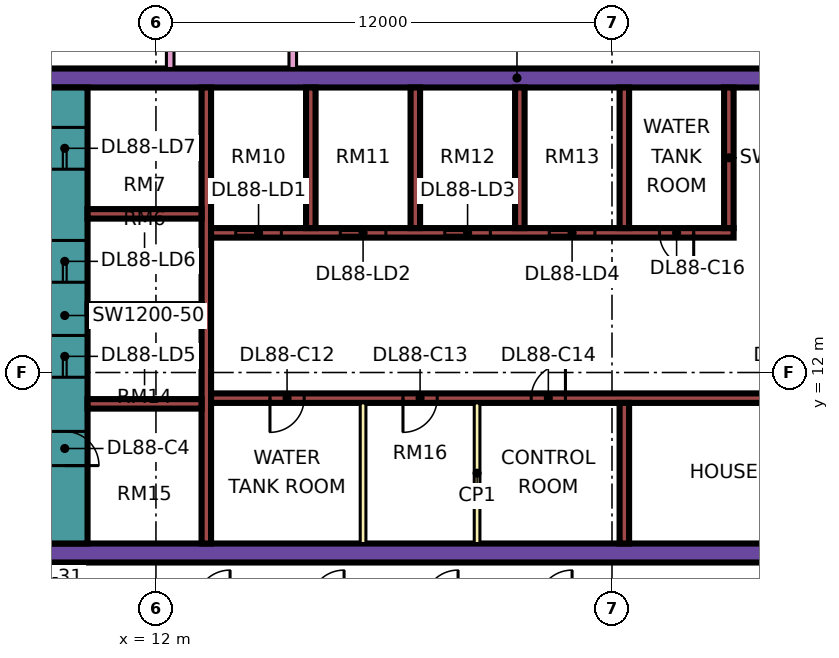
"""IFC4 building model, lengths in metres.
Left out: names, types, materials, properties, quantities, classifications, styles, units other than length and angle.
Written with IfcOpenShell. Run it as: python <this file> out.ifc"""

import sys

from ifc_helpers import new_model, si_unit, direction, frame, frame_2d, origin, place, context, subcontext, project, spatial, rectangle, extrude, element, fill, save


model = new_model("IFC4")
c1 = context("Model", 3, precision=1e-05, world=origin(), true_north=direction((0.0, 1.0)))
c2 = subcontext(c1, "Body", "Model", "MODEL_VIEW")
j1 = project(units=[si_unit("LENGTHUNIT", "METRE"), si_unit("PLANEANGLEUNIT", "RADIAN")], contexts=[c1])
p1 = place(None, origin())
s1 = spatial("IfcSite", under=j1, at=p1, CompositionType="ELEMENT")
p2 = place(p1, origin())
s2 = spatial("IfcBuilding", under=s1, at=p2, CompositionType="ELEMENT")
p3 = place(p2, frame((0.0, 0.0, 376.4)))
s3 = spatial("IfcBuildingStorey", under=s2, at=p3, CompositionType="ELEMENT", Elevation=376.4)
p4 = place(p3, frame((9.0, 7.25, 0.0), z_axis=(0.0, 0.0, 1.0), x_axis=(1.0, 0.0, 0.0)))
e1 = element("IfcWall", 1, at=p4, inside=s3, PredefinedType="SHEAR", context=c2, shape_type="SweptSolid", body=[
    extrude(rectangle(XDim=25.0, YDim=0.5, at=frame_2d((12.5, 0.0))), origin(), (0.0, 0.0, 1.0), 3.75),
])
p5 = place(p3, frame((9.0, 19.75, 0.0), z_axis=(0.0, 0.0, 1.0), x_axis=(1.0, 0.0, 0.0)))
e2 = element("IfcWall", 2, at=p5, inside=s3, PredefinedType="SHEAR", context=c2, shape_type="SweptSolid", body=[
    extrude(rectangle(XDim=25.0, YDim=0.5, at=frame_2d((12.5, 0.0))), origin(), (0.0, 0.0, 1.0), 3.75),
])
p6 = place(p5, frame((19.1, 0.0, 0.0)))
e3 = element("IfcOpeningElement", 3, at=p6, cuts=e2, PredefinedType="OPENING", context=c2, shape_type="SweptSolid", body=[
    extrude(rectangle(XDim=1.8, YDim=2.4, at=frame_2d((0.9, 1.2))), frame((0.0, 0.26, 0.0), z_axis=(0.0, -1.0, 0.0), x_axis=(1.0, 0.0, 0.0)), (0.0, 0.0, 1.0), 0.52),
])
p7 = place(p3, frame((9.6, 7.5, 0.0), z_axis=(0.0, 0.0, 1.0), x_axis=(0.0, 1.0, 0.0)))
e4 = element("IfcWall", 4, at=p7, inside=s3, PredefinedType="SHEAR", context=c2, shape_type="SweptSolid", body=[
    extrude(rectangle(XDim=12.0, YDim=1.2, at=frame_2d((6.0, 0.0))), origin(), (0.0, 0.0, 1.0), 3.75),
])
p8 = place(p7, frame((4.375, 0.0, 0.0)))
e5 = element("IfcOpeningElement", 5, at=p8, cuts=e4, PredefinedType="OPENING", context=c2, shape_type="SweptSolid", body=[
    extrude(rectangle(XDim=1.1, YDim=2.2, at=frame_2d((0.55, 1.1))), frame((0.0, 0.61, 0.0), z_axis=(0.0, -1.0, 0.0), x_axis=(1.0, 0.0, 0.0)), (0.0, 0.0, 1.0), 1.22),
])
p9 = place(p7, frame((6.875, 0.0, 0.0)))
e6 = element("IfcOpeningElement", 6, at=p9, cuts=e4, PredefinedType="OPENING", context=c2, shape_type="SweptSolid", body=[
    extrude(rectangle(XDim=1.1, YDim=2.2, at=frame_2d((0.55, 1.1))), frame((0.0, 0.61, 0.0), z_axis=(0.0, -1.0, 0.0), x_axis=(1.0, 0.0, 0.0)), (0.0, 0.0, 1.0), 1.22),
])
p10 = place(p7, frame((9.85, 0.0, 0.0)))
e7 = element("IfcOpeningElement", 7, at=p10, cuts=e4, PredefinedType="OPENING", context=c2, shape_type="SweptSolid", body=[
    extrude(rectangle(XDim=1.1, YDim=2.2, at=frame_2d((0.55, 1.1))), frame((0.0, 0.61, 0.0), z_axis=(0.0, -1.0, 0.0), x_axis=(1.0, 0.0, 0.0)), (0.0, 0.0, 1.0), 1.22),
])
p11 = place(p7, frame((2.05, 0.0, 0.0)))
e8 = element("IfcOpeningElement", 8, at=p11, cuts=e4, PredefinedType="OPENING", context=c2, shape_type="SweptSolid", body=[
    extrude(rectangle(XDim=0.9, YDim=2.1, at=frame_2d((0.45, 1.05))), frame((0.0, 0.61, 0.0), z_axis=(0.0, -1.0, 0.0), x_axis=(1.0, 0.0, 0.0)), (0.0, 0.0, 1.0), 1.22),
])
p12 = place(p3, frame((13.325, 7.5, 0.0), z_axis=(0.0, 0.0, 1.0), x_axis=(0.0, 1.0, 0.0)))
e9 = element("IfcWall", 9, at=p12, inside=s3, PredefinedType="SHEAR", context=c2, shape_type="SweptSolid", body=[
    extrude(rectangle(XDim=12.0, YDim=0.25, at=frame_2d((6.0, 0.0))), origin(), (0.0, 0.0, 1.0), 3.75),
])
p13 = place(p3, frame((13.45, 11.325, 0.0), z_axis=(0.0, 0.0, 1.0), x_axis=(1.0, 0.0, 0.0)))
e10 = element("IfcWall", 10, at=p13, inside=s3, PredefinedType="SHEAR", context=c2, shape_type="SweptSolid", body=[
    extrude(rectangle(XDim=20.05, YDim=0.25, at=frame_2d((10.025, 0.0))), origin(), (0.0, 0.0, 1.0), 3.75),
])
p14 = place(p13, frame((1.55, 0.0, 0.0)))
e11 = element("IfcOpeningElement", 11, at=p14, cuts=e10, PredefinedType="OPENING", context=c2, shape_type="SweptSolid", body=[
    extrude(rectangle(XDim=0.9, YDim=2.1, at=frame_2d((0.45, 1.05))), frame((0.0, 0.135, 0.0), z_axis=(0.0, -1.0, 0.0), x_axis=(1.0, 0.0, 0.0)), (0.0, 0.0, 1.0), 0.27),
])
p15 = place(p13, frame((5.05, 0.0, 0.0)))
e12 = element("IfcOpeningElement", 12, at=p15, cuts=e10, PredefinedType="OPENING", context=c2, shape_type="SweptSolid", body=[
    extrude(rectangle(XDim=0.9, YDim=2.1, at=frame_2d((0.45, 1.05))), frame((0.0, 0.135, 0.0), z_axis=(0.0, -1.0, 0.0), x_axis=(1.0, 0.0, 0.0)), (0.0, 0.0, 1.0), 0.27),
])
p16 = place(p13, frame((8.425, 0.0, 0.0)))
e13 = element("IfcOpeningElement", 13, at=p16, cuts=e10, PredefinedType="OPENING", context=c2, shape_type="SweptSolid", body=[
    extrude(rectangle(XDim=0.9, YDim=2.1, at=frame_2d((0.45, 1.05))), frame((0.0, 0.135, 0.0), z_axis=(0.0, -1.0, 0.0), x_axis=(1.0, 0.0, 0.0)), (0.0, 0.0, 1.0), 0.27),
])
p17 = place(p13, frame((15.075, 0.0, 0.0)))
e14 = element("IfcOpeningElement", 14, at=p17, cuts=e10, PredefinedType="OPENING", context=c2, shape_type="SweptSolid", body=[
    extrude(rectangle(XDim=0.9, YDim=2.1, at=frame_2d((0.45, 1.05))), frame((0.0, 0.135, 0.0), z_axis=(0.0, -1.0, 0.0), x_axis=(1.0, 0.0, 0.0)), (0.0, 0.0, 1.0), 0.27),
])
p18 = place(p3, frame((13.45, 15.675, 0.0), z_axis=(0.0, 0.0, 1.0), x_axis=(1.0, 0.0, 0.0)))
e15 = element("IfcWall", 15, at=p18, inside=s3, PredefinedType="SHEAR", context=c2, shape_type="SweptSolid", body=[
    extrude(rectangle(XDim=13.75, YDim=0.25, at=frame_2d((6.875, 0.0))), origin(), (0.0, 0.0, 1.0), 3.75),
])
p19 = place(p18, frame((0.65, 0.0, 0.0)))
e16 = element("IfcOpeningElement", 16, at=p19, cuts=e15, PredefinedType="OPENING", context=c2, shape_type="SweptSolid", body=[
    extrude(rectangle(XDim=1.2, YDim=2.2, at=frame_2d((0.6, 1.1))), frame((0.0, 0.135, 0.0), z_axis=(0.0, -1.0, 0.0), x_axis=(1.0, 0.0, 0.0)), (0.0, 0.0, 1.0), 0.27),
])
p20 = place(p18, frame((3.4, 0.0, 0.0)))
e17 = element("IfcOpeningElement", 17, at=p20, cuts=e15, PredefinedType="OPENING", context=c2, shape_type="SweptSolid", body=[
    extrude(rectangle(XDim=1.2, YDim=2.2, at=frame_2d((0.6, 1.1))), frame((0.0, 0.135, 0.0), z_axis=(0.0, -1.0, 0.0), x_axis=(1.0, 0.0, 0.0)), (0.0, 0.0, 1.0), 0.27),
])
p21 = place(p18, frame((6.15, 0.0, 0.0)))
e18 = element("IfcOpeningElement", 18, at=p21, cuts=e15, PredefinedType="OPENING", context=c2, shape_type="SweptSolid", body=[
    extrude(rectangle(XDim=1.2, YDim=2.2, at=frame_2d((0.6, 1.1))), frame((0.0, 0.135, 0.0), z_axis=(0.0, -1.0, 0.0), x_axis=(1.0, 0.0, 0.0)), (0.0, 0.0, 1.0), 0.27),
])
p22 = place(p18, frame((8.9, 0.0, 0.0)))
e19 = element("IfcOpeningElement", 19, at=p22, cuts=e15, PredefinedType="OPENING", context=c2, shape_type="SweptSolid", body=[
    extrude(rectangle(XDim=1.2, YDim=2.2, at=frame_2d((0.6, 1.1))), frame((0.0, 0.135, 0.0), z_axis=(0.0, -1.0, 0.0), x_axis=(1.0, 0.0, 0.0)), (0.0, 0.0, 1.0), 0.27),
])
p23 = place(p18, frame((11.8, 0.0, 0.0)))
e20 = element("IfcOpeningElement", 20, at=p23, cuts=e15, PredefinedType="OPENING", context=c2, shape_type="SweptSolid", body=[
    extrude(rectangle(XDim=0.9, YDim=2.1, at=frame_2d((0.45, 1.05))), frame((0.0, 0.135, 0.0), z_axis=(0.0, -1.0, 0.0), x_axis=(1.0, 0.0, 0.0)), (0.0, 0.0, 1.0), 0.27),
])
for number, where, z_axis, x_axis in (
    (21, (10.2, 11.175, 0.0), (0.0, 0.0, 1.0), (1.0, 0.0, 0.0)),
    (22, (10.2, 13.675, 0.0), (0.0, 0.0, 1.0), (1.0, 0.0, 0.0)),
    (23, (10.2, 16.175, 0.0), (0.0, 0.0, 1.0), (1.0, 0.0, 0.0)),
):
    element("IfcWall", number, at=place(p3, frame(where, z_axis=z_axis, x_axis=x_axis)), inside=s3, PredefinedType="SHEAR", context=c2, shape_type="SweptSolid", body=[
        extrude(rectangle(XDim=3.0, YDim=0.25, at=frame_2d((1.5, 0.0))), origin(), (0.0, 0.0, 1.0), 3.75),
    ])
for number, where, z_axis, x_axis in (
    (24, (24.325, 7.5, 0.0), (0.0, 0.0, 1.0), (0.0, 1.0, 0.0)),
    (25, (16.075, 15.8, 0.0), (0.0, 0.0, 1.0), (0.0, 1.0, 0.0)),
    (26, (18.825, 15.8, 0.0), (0.0, 0.0, 1.0), (0.0, 1.0, 0.0)),
    (27, (21.575, 15.8, 0.0), (0.0, 0.0, 1.0), (0.0, 1.0, 0.0)),
    (28, (24.325, 15.8, 0.0), (0.0, 0.0, 1.0), (0.0, 1.0, 0.0)),
    (29, (27.075, 15.8, 0.0), (0.0, 0.0, 1.0), (0.0, 1.0, 0.0)),
):
    element("IfcWall", number, at=place(p3, frame(where, z_axis=z_axis, x_axis=x_axis)), inside=s3, PredefinedType="SHEAR", context=c2, shape_type="SweptSolid", body=[
        extrude(rectangle(XDim=3.7, YDim=0.25, at=frame_2d((1.85, 0.0))), origin(), (0.0, 0.0, 1.0), 3.75),
    ])
p24 = place(p3, frame((-1.447, 12.553, 0.0), z_axis=(0.0, 0.0, 1.0), x_axis=(0.707106781187, -0.707106781187, 0.0)))
e30 = element("IfcWall", 30, at=p24, inside=s3, PredefinedType="SOLIDWALL", context=c2, shape_type="SweptSolid", body=[
    extrude(rectangle(XDim=19.799, YDim=0.15, at=frame_2d((9.899, 0.0))), origin(), (0.0, 0.0, 1.0), 3.35),
])
p25 = place(p24, frame((2.212, 0.0, 0.45)))
e31 = element("IfcOpeningElement", 31, at=p25, cuts=e30, PredefinedType="OPENING", context=c2, shape_type="SweptSolid", body=[
    extrude(rectangle(XDim=3.0, YDim=2.4, at=frame_2d((1.5, 1.2))), frame((0.0, 0.085, 0.0), z_axis=(0.0, -1.0, 0.0), x_axis=(1.0, 0.0, 0.0)), (0.0, 0.0, 1.0), 0.17),
])
p26 = place(p24, frame((10.216, 0.0, 0.45)))
e32 = element("IfcOpeningElement", 32, at=p26, cuts=e30, PredefinedType="OPENING", context=c2, shape_type="SweptSolid", body=[
    extrude(rectangle(XDim=3.0, YDim=2.4, at=frame_2d((1.5, 1.2))), frame((0.0, 0.085, 0.0), z_axis=(0.0, -1.0, 0.0), x_axis=(1.0, 0.0, 0.0)), (0.0, 0.0, 1.0), 0.17),
])
for number, where, z_axis, x_axis in (
    (33, (17.45, 7.5, 0.0), (0.0, 0.0, 1.0), (0.0, 1.0, 0.0)),
    (34, (20.45, 7.5, 0.0), (0.0, 0.0, 1.0), (0.0, 1.0, 0.0)),
):
    element("IfcWall", number, at=place(p3, frame(where, z_axis=z_axis, x_axis=x_axis)), inside=s3, PredefinedType="PARTITIONING", context=c2, shape_type="SweptSolid", body=[
        extrude(rectangle(XDim=3.7, YDim=0.15, at=frame_2d((1.85, 0.0))), origin(), (0.0, 0.0, 1.0), 3.35),
    ])
p27 = place(p3, frame((12.375, 20.0, 0.0), z_axis=(0.0, 0.0, 1.0), x_axis=(0.0, 1.0, 0.0)))
e35 = element("IfcWall", 35, at=p27, inside=s3, PredefinedType="PARTITIONING", context=c2, shape_type="SweptSolid", body=[
    extrude(rectangle(XDim=33.926, YDim=0.2, at=frame_2d((16.963, 0.0))), origin(), (0.0, 0.0, 1.0), 3.35),
])
p28 = place(p27, frame((27.6, 0.0, 0.0)))
e36 = element("IfcOpeningElement", 36, at=p28, cuts=e35, PredefinedType="OPENING", context=c2, shape_type="SweptSolid", body=[
    extrude(rectangle(XDim=1.0, YDim=2.1, at=frame_2d((0.5, 1.05))), frame((0.0, 0.11, 0.0), z_axis=(0.0, -1.0, 0.0), x_axis=(1.0, 0.0, 0.0)), (0.0, 0.0, 1.0), 0.22),
])
p29 = place(p27, frame((0.6, 0.0, 0.0)))
e37 = element("IfcOpeningElement", 37, at=p29, cuts=e35, PredefinedType="OPENING", context=c2, shape_type="SweptSolid", body=[
    extrude(rectangle(XDim=1.2, YDim=2.1, at=frame_2d((0.6, 1.05))), frame((0.0, 0.11, 0.0), z_axis=(0.0, -1.0, 0.0), x_axis=(1.0, 0.0, 0.0)), (0.0, 0.0, 1.0), 0.22),
])
p30 = place(p27, frame((14.1, 0.0, 0.0)))
e38 = element("IfcOpeningElement", 38, at=p30, cuts=e35, PredefinedType="OPENING", context=c2, shape_type="SweptSolid", body=[
    extrude(rectangle(XDim=1.0, YDim=2.1, at=frame_2d((0.5, 1.05))), frame((0.0, 0.11, 0.0), z_axis=(0.0, -1.0, 0.0), x_axis=(1.0, 0.0, 0.0)), (0.0, 0.0, 1.0), 0.22),
])
p31 = place(p3, frame((15.6, 20.0, 0.0), z_axis=(0.0, 0.0, 1.0), x_axis=(0.0, 1.0, 0.0)))
e39 = element("IfcWall", 39, at=p31, inside=s3, PredefinedType="PARTITIONING", context=c2, shape_type="SweptSolid", body=[
    extrude(rectangle(XDim=27.775, YDim=0.2, at=frame_2d((13.887, 0.0))), origin(), (0.0, 0.0, 1.0), 3.35),
])
p32 = place(p31, frame((7.15, 0.0, 0.0)))
e40 = element("IfcOpeningElement", 40, at=p32, cuts=e39, PredefinedType="OPENING", context=c2, shape_type="SweptSolid", body=[
    extrude(rectangle(XDim=1.6, YDim=2.1, at=frame_2d((0.8, 1.05))), frame((0.0, 0.11, 0.0), z_axis=(0.0, -1.0, 0.0), x_axis=(1.0, 0.0, 0.0)), (0.0, 0.0, 1.0), 0.22),
])
p33 = place(p31, frame((13.5, 0.0, 0.0)))
e41 = element("IfcOpeningElement", 41, at=p33, cuts=e39, PredefinedType="OPENING", context=c2, shape_type="SweptSolid", body=[
    extrude(rectangle(XDim=1.0, YDim=2.1, at=frame_2d((0.5, 1.05))), frame((0.0, 0.11, 0.0), z_axis=(0.0, -1.0, 0.0), x_axis=(1.0, 0.0, 0.0)), (0.0, 0.0, 1.0), 0.22),
])
p34 = place(p31, frame((22.9, 0.0, 0.0)))
e42 = element("IfcOpeningElement", 42, at=p34, cuts=e39, PredefinedType="OPENING", context=c2, shape_type="SweptSolid", body=[
    extrude(rectangle(XDim=1.0, YDim=2.1, at=frame_2d((0.5, 1.05))), frame((0.0, 0.11, 0.0), z_axis=(0.0, -1.0, 0.0), x_axis=(1.0, 0.0, 0.0)), (0.0, 0.0, 1.0), 0.22),
])
p35 = place(p31, frame((1.15, 0.0, 0.0)))
e43 = element("IfcOpeningElement", 43, at=p35, cuts=e39, PredefinedType="OPENING", context=c2, shape_type="SweptSolid", body=[
    extrude(rectangle(XDim=1.8, YDim=2.1, at=frame_2d((0.9, 1.05))), frame((0.0, 0.11, 0.0), z_axis=(0.0, -1.0, 0.0), x_axis=(1.0, 0.0, 0.0)), (0.0, 0.0, 1.0), 0.22),
])
p36 = place(p31, frame((25.9, 0.0, 0.0)))
e44 = element("IfcOpeningElement", 44, at=p36, cuts=e39, PredefinedType="OPENING", context=c2, shape_type="SweptSolid", body=[
    extrude(rectangle(XDim=1.0, YDim=2.1, at=frame_2d((0.5, 1.05))), frame((0.0, 0.11, 0.0), z_axis=(0.0, -1.0, 0.0), x_axis=(1.0, 0.0, 0.0)), (0.0, 0.0, 1.0), 0.22),
])
p37 = place(p19, origin())
e45 = element("IfcDoor", 45, at=p37, inside=s3, OperationType="DOUBLE_DOOR_SLIDING", PredefinedType="DOOR", context=c2, shape_type="SweptSolid", body=[
    extrude(rectangle(XDim=1.2, YDim=2.2, at=frame_2d((0.6, 1.1))), frame((0.0, 0.025, 0.0), z_axis=(0.0, -1.0, 0.0), x_axis=(1.0, 0.0, 0.0)), (0.0, 0.0, 1.0), 0.05),
])
fill(e16, e45)
p38 = place(p20, origin())
e46 = element("IfcDoor", 46, at=p38, inside=s3, OperationType="DOUBLE_DOOR_SLIDING", PredefinedType="DOOR", context=c2, shape_type="SweptSolid", body=[
    extrude(rectangle(XDim=1.2, YDim=2.2, at=frame_2d((0.6, 1.1))), frame((0.0, 0.025, 0.0), z_axis=(0.0, -1.0, 0.0), x_axis=(1.0, 0.0, 0.0)), (0.0, 0.0, 1.0), 0.05),
])
fill(e17, e46)
p39 = place(p21, origin())
e47 = element("IfcDoor", 47, at=p39, inside=s3, OperationType="DOUBLE_DOOR_SLIDING", PredefinedType="DOOR", context=c2, shape_type="SweptSolid", body=[
    extrude(rectangle(XDim=1.2, YDim=2.2, at=frame_2d((0.6, 1.1))), frame((0.0, 0.025, 0.0), z_axis=(0.0, -1.0, 0.0), x_axis=(1.0, 0.0, 0.0)), (0.0, 0.0, 1.0), 0.05),
])
fill(e18, e47)
p40 = place(p22, origin())
e48 = element("IfcDoor", 48, at=p40, inside=s3, OperationType="DOUBLE_DOOR_SLIDING", PredefinedType="DOOR", context=c2, shape_type="SweptSolid", body=[
    extrude(rectangle(XDim=1.2, YDim=2.2, at=frame_2d((0.6, 1.1))), frame((0.0, 0.025, 0.0), z_axis=(0.0, -1.0, 0.0), x_axis=(1.0, 0.0, 0.0)), (0.0, 0.0, 1.0), 0.05),
])
fill(e19, e48)
p41 = place(p8, origin())
e49 = element("IfcDoor", 49, at=p41, inside=s3, OperationType="DOUBLE_DOOR_SLIDING", PredefinedType="DOOR", context=c2, shape_type="SweptSolid", body=[
    extrude(rectangle(XDim=1.1, YDim=2.2, at=frame_2d((0.55, 1.1))), frame((0.0, 0.025, 0.0), z_axis=(0.0, -1.0, 0.0), x_axis=(1.0, 0.0, 0.0)), (0.0, 0.0, 1.0), 0.05),
])
fill(e5, e49)
p42 = place(p9, origin())
e50 = element("IfcDoor", 50, at=p42, inside=s3, OperationType="DOUBLE_DOOR_SLIDING", PredefinedType="DOOR", context=c2, shape_type="SweptSolid", body=[
    extrude(rectangle(XDim=1.1, YDim=2.2, at=frame_2d((0.55, 1.1))), frame((0.0, 0.025, 0.0), z_axis=(0.0, -1.0, 0.0), x_axis=(1.0, 0.0, 0.0)), (0.0, 0.0, 1.0), 0.05),
])
fill(e6, e50)
p43 = place(p10, origin())
e51 = element("IfcDoor", 51, at=p43, inside=s3, OperationType="DOUBLE_DOOR_SLIDING", PredefinedType="DOOR", context=c2, shape_type="SweptSolid", body=[
    extrude(rectangle(XDim=1.1, YDim=2.2, at=frame_2d((0.55, 1.1))), frame((0.0, 0.025, 0.0), z_axis=(0.0, -1.0, 0.0), x_axis=(1.0, 0.0, 0.0)), (0.0, 0.0, 1.0), 0.05),
])
fill(e7, e51)
p44 = place(p11, frame((0.9, 0.0, 0.0), z_axis=(0.0, 0.0, 1.0), x_axis=(-1.0, 0.0, 0.0)))
e52 = element("IfcDoor", 52, at=p44, inside=s3, OperationType="SINGLE_SWING_LEFT", PredefinedType="DOOR", context=c2, shape_type="SweptSolid", body=[
    extrude(rectangle(XDim=0.9, YDim=2.1, at=frame_2d((0.45, 1.05))), frame((0.0, 0.025, 0.0), z_axis=(0.0, -1.0, 0.0), x_axis=(1.0, 0.0, 0.0)), (0.0, 0.0, 1.0), 0.05),
])
fill(e8, e52)
p45 = place(p14, frame((0.9, 0.0, 0.0), z_axis=(0.0, 0.0, 1.0), x_axis=(-1.0, 0.0, 0.0)))
e53 = element("IfcDoor", 53, at=p45, inside=s3, OperationType="SINGLE_SWING_LEFT", PredefinedType="DOOR", context=c2, shape_type="SweptSolid", body=[
    extrude(rectangle(XDim=0.9, YDim=2.1, at=frame_2d((0.45, 1.05))), frame((0.0, 0.025, 0.0), z_axis=(0.0, -1.0, 0.0), x_axis=(1.0, 0.0, 0.0)), (0.0, 0.0, 1.0), 0.05),
])
fill(e11, e53)
p46 = place(p15, frame((0.9, 0.0, 0.0), z_axis=(0.0, 0.0, 1.0), x_axis=(-1.0, 0.0, 0.0)))
e54 = element("IfcDoor", 54, at=p46, inside=s3, OperationType="SINGLE_SWING_LEFT", PredefinedType="DOOR", context=c2, shape_type="SweptSolid", body=[
    extrude(rectangle(XDim=0.9, YDim=2.1, at=frame_2d((0.45, 1.05))), frame((0.0, 0.025, 0.0), z_axis=(0.0, -1.0, 0.0), x_axis=(1.0, 0.0, 0.0)), (0.0, 0.0, 1.0), 0.05),
])
fill(e12, e54)
p47 = place(p16, frame((0.9, 0.0, 0.0), z_axis=(0.0, 0.0, 1.0), x_axis=(-1.0, 0.0, 0.0)))
e55 = element("IfcDoor", 55, at=p47, inside=s3, OperationType="SINGLE_SWING_RIGHT", PredefinedType="DOOR", context=c2, shape_type="SweptSolid", body=[
    extrude(rectangle(XDim=0.9, YDim=2.1, at=frame_2d((0.45, 1.05))), frame((0.0, 0.025, 0.0), z_axis=(0.0, -1.0, 0.0), x_axis=(1.0, 0.0, 0.0)), (0.0, 0.0, 1.0), 0.05),
])
fill(e13, e55)
p48 = place(p23, origin())
e56 = element("IfcDoor", 56, at=p48, inside=s3, OperationType="SINGLE_SWING_RIGHT", PredefinedType="DOOR", context=c2, shape_type="SweptSolid", body=[
    extrude(rectangle(XDim=0.9, YDim=2.1, at=frame_2d((0.45, 1.05))), frame((0.0, 0.025, 0.0), z_axis=(0.0, -1.0, 0.0), x_axis=(1.0, 0.0, 0.0)), (0.0, 0.0, 1.0), 0.05),
])
fill(e20, e56)
save(model, sys.argv[1])
